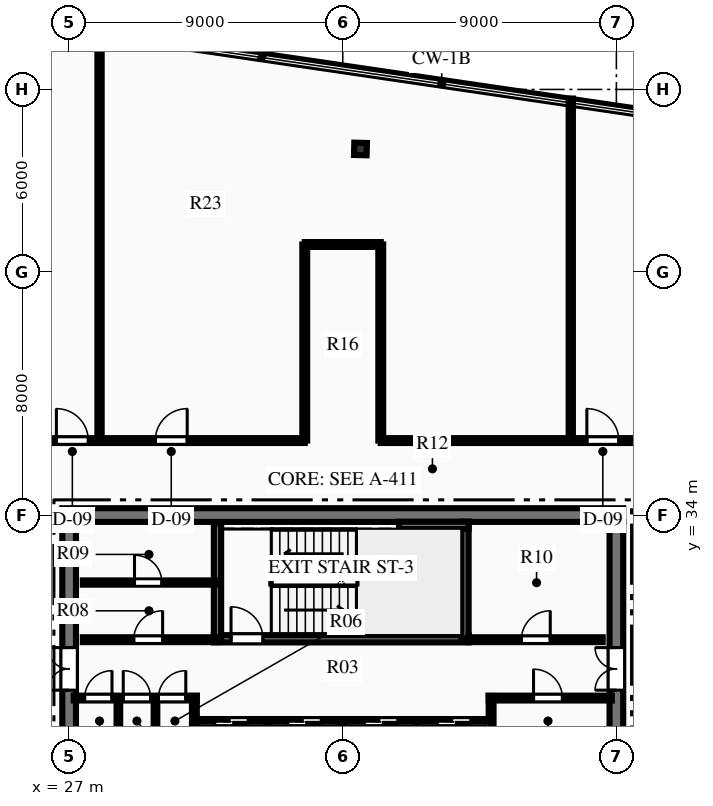
"""IFC4 building model, lengths in metres.
Left out: names, types, materials, properties, quantities, classifications, styles, units other than length and angle.
Written with IfcOpenShell. Run it as: python <this file> out.ifc"""

import sys

from ifc_helpers import new_model, si_unit, direction, frame, frame_2d, origin, origin_2d, place, context, subcontext, project, spatial, rectangle, i_section, extrude, element, fill, save


model = new_model("IFC4")
c1 = context("Model", 3, precision=1e-05, world=origin(), true_north=direction((0.0, 1.0)))
c2 = subcontext(c1, "Body", "Model", "MODEL_VIEW")
j1 = project(units=[si_unit("LENGTHUNIT", "METRE"), si_unit("PLANEANGLEUNIT", "RADIAN")], contexts=[c1])
p1 = place(None, origin())
s1 = spatial("IfcSite", under=j1, at=p1, CompositionType="ELEMENT")
p2 = place(p1, origin())
s2 = spatial("IfcBuilding", under=s1, at=p2, CompositionType="ELEMENT")
p3 = place(p2, frame((0.0, 0.0, 302.7)))
s3 = spatial("IfcBuildingStorey", under=s2, at=p3, CompositionType="ELEMENT", Elevation=302.7)
p4 = place(p3, frame((26.775, 34.0, 0.0), z_axis=(0.0, 0.0, 1.0), x_axis=(1.0, 0.0, 0.0)))
e1 = element("IfcWall", 1, at=p4, inside=s3, PredefinedType="SHEAR", context=c2, shape_type="SweptSolid", body=[
    extrude(rectangle(XDim=18.45, YDim=0.45, at=frame_2d((9.225, 0.0))), origin(), (0.0, 0.0, 1.0), 3.75),
])
p5 = place(p3, frame((27.0, 18.225, 0.0), z_axis=(0.0, 0.0, 1.0), x_axis=(0.0, 1.0, 0.0)))
e2 = element("IfcWall", 2, at=p5, inside=s3, PredefinedType="SHEAR", context=c2, shape_type="SweptSolid", body=[
    extrude(rectangle(XDim=15.55, YDim=0.45, at=frame_2d((7.775, 0.0))), origin(), (0.0, 0.0, 1.0), 3.75),
])
p6 = place(p5, frame((10.015, 0.0, 0.0)))
e3 = element("IfcOpeningElement", 3, at=p6, cuts=e2, PredefinedType="OPENING", context=c2, shape_type="SweptSolid", body=[
    extrude(rectangle(XDim=1.4, YDim=2.2, at=frame_2d((0.7, 1.1))), frame((0.0, 0.235, 0.0), z_axis=(0.0, -1.0, 0.0), x_axis=(1.0, 0.0, 0.0)), (0.0, 0.0, 1.0), 0.47),
])
p7 = place(p3, frame((45.0, 18.225, 0.0), z_axis=(0.0, 0.0, 1.0), x_axis=(0.0, 1.0, 0.0)))
e4 = element("IfcWall", 4, at=p7, inside=s3, PredefinedType="SHEAR", context=c2, shape_type="SweptSolid", body=[
    extrude(rectangle(XDim=15.55, YDim=0.45, at=frame_2d((7.775, 0.0))), origin(), (0.0, 0.0, 1.0), 3.75),
])
p8 = place(p7, frame((10.015, 0.0, 0.0)))
e5 = element("IfcOpeningElement", 5, at=p8, cuts=e4, PredefinedType="OPENING", context=c2, shape_type="SweptSolid", body=[
    extrude(rectangle(XDim=1.4, YDim=2.2, at=frame_2d((0.7, 1.1))), frame((0.0, 0.235, 0.0), z_axis=(0.0, -1.0, 0.0), x_axis=(1.0, 0.0, 0.0)), (0.0, 0.0, 1.0), 0.47),
])
p9 = place(p3, frame((31.76, 29.93, 0.0), z_axis=(0.0, 0.0, 1.0), x_axis=(1.0, 0.0, 0.0)))
e6 = element("IfcWall", 6, at=p9, inside=s3, PredefinedType="SHEAR", context=c2, shape_type="SweptSolid", body=[
    extrude(rectangle(XDim=8.38, YDim=0.24, at=frame_2d((4.19, 0.0))), origin(), (0.0, 0.0, 1.0), 3.75),
])
p10 = place(p9, frame((0.565, 0.0, 0.0)))
e7 = element("IfcOpeningElement", 7, at=p10, cuts=e6, PredefinedType="OPENING", context=c2, shape_type="SweptSolid", body=[
    extrude(rectangle(XDim=1.05, YDim=2.15, at=frame_2d((0.525, 1.075))), frame((0.0, 0.13, 0.0), z_axis=(0.0, -1.0, 0.0), x_axis=(1.0, 0.0, 0.0)), (0.0, 0.0, 1.0), 0.26),
])
p11 = place(p3, frame((31.88, 29.93, 0.0), z_axis=(0.0, 0.0, 1.0), x_axis=(0.0, 1.0, 0.0)))
e8 = element("IfcWall", 8, at=p11, inside=s3, PredefinedType="SHEAR", context=c2, shape_type="SweptSolid", body=[
    extrude(rectangle(XDim=3.79, YDim=0.24, at=frame_2d((1.895, 0.0))), origin(), (0.0, 0.0, 1.0), 3.75),
])
p12 = place(p3, frame((40.02, 29.93, 0.0), z_axis=(0.0, 0.0, 1.0), x_axis=(0.0, 1.0, 0.0)))
e9 = element("IfcWall", 9, at=p12, inside=s3, PredefinedType="SHEAR", context=c2, shape_type="SweptSolid", body=[
    extrude(rectangle(XDim=3.85, YDim=0.24, at=frame_2d((1.925, 0.0))), origin(), (0.0, 0.0, 1.0), 3.75),
])
p13 = place(p3, frame((37.85, 33.66, 0.0), z_axis=(0.0, 0.0, 1.0), x_axis=(1.0, 0.0, 0.0)))
e10 = element("IfcWall", 10, at=p13, inside=s3, PredefinedType="SHEAR", context=c2, shape_type="SweptSolid", body=[
    extrude(rectangle(XDim=2.29, YDim=0.24, at=frame_2d((1.145, 0.0))), origin(), (0.0, 0.0, 1.0), 3.75),
])
p14 = place(p3, frame((36.582, 46.042, 0.0), z_axis=(0.0, 0.0, 1.0), x_axis=(0.025304572866, 0.999679788028, 0.0)))
e11 = element("IfcColumn", 11, at=p14, inside=s3, PredefinedType="COLUMN", context=c2, shape_type="SweptSolid", body=[
    extrude(i_section(OverallWidth=0.406, OverallDepth=0.416, WebThickness=0.03, FlangeThickness=0.048, at=origin_2d()), origin(), (0.0, 0.0, 1.0), 3.75),
])
p15 = place(p3, frame((27.15, 27.98, 0.0), z_axis=(0.0, 0.0, 1.0), x_axis=(1.0, 0.0, 0.0)))
e12 = element("IfcWall", 12, at=p15, inside=s3, PredefinedType="PARTITIONING", context=c2, shape_type="SweptSolid", body=[
    extrude(rectangle(XDim=4.05, YDim=0.16, at=frame_2d((2.025, 0.0))), origin(), (0.0, 0.0, 1.0), 3.49),
])
p16 = place(p15, frame((0.36, 0.0, 0.0)))
e13 = element("IfcOpeningElement", 13, at=p16, cuts=e12, PredefinedType="OPENING", context=c2, shape_type="SweptSolid", body=[
    extrude(rectangle(XDim=0.9, YDim=2.15, at=frame_2d((0.45, 1.075))), frame((0.0, 0.09, 0.0), z_axis=(0.0, -1.0, 0.0), x_axis=(1.0, 0.0, 0.0)), (0.0, 0.0, 1.0), 0.18),
])
p17 = place(p15, frame((1.63, 0.0, 0.0)))
e14 = element("IfcOpeningElement", 14, at=p17, cuts=e12, PredefinedType="OPENING", context=c2, shape_type="SweptSolid", body=[
    extrude(rectangle(XDim=0.9, YDim=2.15, at=frame_2d((0.45, 1.075))), frame((0.0, 0.09, 0.0), z_axis=(0.0, -1.0, 0.0), x_axis=(1.0, 0.0, 0.0)), (0.0, 0.0, 1.0), 0.18),
])
p18 = place(p15, frame((2.788, 0.0, 0.0)))
e15 = element("IfcOpeningElement", 15, at=p18, cuts=e12, PredefinedType="OPENING", context=c2, shape_type="SweptSolid", body=[
    extrude(rectangle(XDim=0.9, YDim=2.15, at=frame_2d((0.45, 1.075))), frame((0.0, 0.09, 0.0), z_axis=(0.0, -1.0, 0.0), x_axis=(1.0, 0.0, 0.0)), (0.0, 0.0, 1.0), 0.18),
])
p19 = place(p3, frame((31.12, 26.54, 0.0), z_axis=(0.0, 0.0, 1.0), x_axis=(0.0, 1.0, 0.0)))
e16 = element("IfcWall", 16, at=p19, inside=s3, PredefinedType="PARTITIONING", context=c2, shape_type="SweptSolid", body=[
    extrude(rectangle(XDim=1.51, YDim=0.16, at=frame_2d((0.755, 0.0))), origin(), (0.0, 0.0, 1.0), 3.49),
])
p20 = place(p3, frame((40.8, 27.98, 0.0), z_axis=(0.0, 0.0, 1.0), x_axis=(1.0, 0.0, 0.0)))
e17 = element("IfcWall", 17, at=p20, inside=s3, PredefinedType="PARTITIONING", context=c2, shape_type="SweptSolid", body=[
    extrude(rectangle(XDim=4.05, YDim=0.16, at=frame_2d((2.025, 0.0))), origin(), (0.0, 0.0, 1.0), 3.49),
])
p21 = place(p20, frame((1.475, 0.0, 0.0)))
e18 = element("IfcOpeningElement", 18, at=p21, cuts=e17, PredefinedType="OPENING", context=c2, shape_type="SweptSolid", body=[
    extrude(rectangle(XDim=0.95, YDim=2.15, at=frame_2d((0.475, 1.075))), frame((0.0, 0.09, 0.0), z_axis=(0.0, -1.0, 0.0), x_axis=(1.0, 0.0, 0.0)), (0.0, 0.0, 1.0), 0.18),
])
p22 = place(p3, frame((40.88, 26.54, 0.0), z_axis=(0.0, 0.0, 1.0), x_axis=(0.0, 1.0, 0.0)))
e19 = element("IfcWall", 19, at=p22, inside=s3, PredefinedType="PARTITIONING", context=c2, shape_type="SweptSolid", body=[
    extrude(rectangle(XDim=1.51, YDim=0.16, at=frame_2d((0.755, 0.0))), origin(), (0.0, 0.0, 1.0), 3.49),
])
for number, where, z_axis, x_axis in (
    (20, (28.62, 26.54, 0.0), (0.0, 0.0, 1.0), (0.0, 1.0, 0.0)),
    (21, (29.84, 26.54, 0.0), (0.0, 0.0, 1.0), (0.0, 1.0, 0.0)),
):
    element("IfcWall", number, at=place(p3, frame(where, z_axis=z_axis, x_axis=x_axis)), inside=s3, PredefinedType="PARTITIONING", context=c2, shape_type="SweptSolid", body=[
        extrude(rectangle(XDim=1.44, YDim=0.12, at=frame_2d((0.72, 0.0))), origin(), (0.0, 0.0, 1.0), 3.49),
    ])
p23 = place(p3, frame((27.45, 29.9, 0.0), z_axis=(0.0, 0.0, 1.0), x_axis=(1.0, 0.0, 0.0)))
e22 = element("IfcWall", 22, at=p23, inside=s3, PredefinedType="PARTITIONING", context=c2, shape_type="SweptSolid", body=[
    extrude(rectangle(XDim=4.43, YDim=0.16, at=frame_2d((2.215, 0.0))), origin(), (0.0, 0.0, 1.0), 3.49),
])
p24 = place(p23, frame((1.675, 0.0, 0.0)))
e23 = element("IfcOpeningElement", 23, at=p24, cuts=e22, PredefinedType="OPENING", context=c2, shape_type="SweptSolid", body=[
    extrude(rectangle(XDim=0.95, YDim=2.15, at=frame_2d((0.475, 1.075))), frame((0.0, 0.09, 0.0), z_axis=(0.0, -1.0, 0.0), x_axis=(1.0, 0.0, 0.0)), (0.0, 0.0, 1.0), 0.18),
])
p25 = place(p3, frame((27.45, 31.78, 0.0), z_axis=(0.0, 0.0, 1.0), x_axis=(1.0, 0.0, 0.0)))
e24 = element("IfcWall", 24, at=p25, inside=s3, PredefinedType="PARTITIONING", context=c2, shape_type="SweptSolid", body=[
    extrude(rectangle(XDim=4.35, YDim=0.14, at=frame_2d((2.175, 0.0))), origin(), (0.0, 0.0, 1.0), 3.49),
])
p26 = place(p25, frame((1.7, 0.0, 0.0)))
e25 = element("IfcOpeningElement", 25, at=p26, cuts=e24, PredefinedType="OPENING", context=c2, shape_type="SweptSolid", body=[
    extrude(rectangle(XDim=0.9, YDim=2.15, at=frame_2d((0.45, 1.075))), frame((0.0, 0.08, 0.0), z_axis=(0.0, -1.0, 0.0), x_axis=(1.0, 0.0, 0.0)), (0.0, 0.0, 1.0), 0.16),
])
p27 = place(p3, frame((40.12, 29.9, 0.0), z_axis=(0.0, 0.0, 1.0), x_axis=(1.0, 0.0, 0.0)))
e26 = element("IfcWall", 26, at=p27, inside=s3, PredefinedType="PARTITIONING", context=c2, shape_type="SweptSolid", body=[
    extrude(rectangle(XDim=4.43, YDim=0.16, at=frame_2d((2.215, 0.0))), origin(), (0.0, 0.0, 1.0), 3.49),
])
p28 = place(p27, frame((1.755, 0.0, 0.0)))
e27 = element("IfcOpeningElement", 27, at=p28, cuts=e26, PredefinedType="OPENING", context=c2, shape_type="SweptSolid", body=[
    extrude(rectangle(XDim=0.95, YDim=2.15, at=frame_2d((0.475, 1.075))), frame((0.0, 0.09, 0.0), z_axis=(0.0, -1.0, 0.0), x_axis=(1.0, 0.0, 0.0)), (0.0, 0.0, 1.0), 0.18),
])
p29 = place(p3, frame((31.2, 27.2, 0.0), z_axis=(0.0, 0.0, 1.0), x_axis=(1.0, 0.0, 0.0)))
e28 = element("IfcWall", 28, at=p29, inside=s3, PredefinedType="PARTITIONING", context=c2, shape_type="SweptSolid", body=[
    extrude(rectangle(XDim=9.6, YDim=0.18, at=frame_2d((4.8, 0.0))), origin(), (0.0, 0.0, 1.0), 3.49),
])
p30 = place(p29, frame((0.59, 0.0, 0.0)))
e29 = element("IfcOpeningElement", 29, at=p30, cuts=e28, PredefinedType="OPENING", context=c2, shape_type="SweptSolid", body=[
    extrude(rectangle(XDim=1.1, YDim=2.15, at=frame_2d((0.55, 1.075))), frame((0.0, 0.1, 0.0), z_axis=(0.0, -1.0, 0.0), x_axis=(1.0, 0.0, 0.0)), (0.0, 0.0, 1.0), 0.2),
])
p31 = place(p29, frame((2.99, 0.0, 0.0)))
e30 = element("IfcOpeningElement", 30, at=p31, cuts=e28, PredefinedType="OPENING", context=c2, shape_type="SweptSolid", body=[
    extrude(rectangle(XDim=1.1, YDim=2.15, at=frame_2d((0.55, 1.075))), frame((0.0, 0.1, 0.0), z_axis=(0.0, -1.0, 0.0), x_axis=(1.0, 0.0, 0.0)), (0.0, 0.0, 1.0), 0.2),
])
p32 = place(p29, frame((5.51, 0.0, 0.0)))
e31 = element("IfcOpeningElement", 31, at=p32, cuts=e28, PredefinedType="OPENING", context=c2, shape_type="SweptSolid", body=[
    extrude(rectangle(XDim=1.1, YDim=2.15, at=frame_2d((0.55, 1.075))), frame((0.0, 0.1, 0.0), z_axis=(0.0, -1.0, 0.0), x_axis=(1.0, 0.0, 0.0)), (0.0, 0.0, 1.0), 0.2),
])
p33 = place(p29, frame((7.91, 0.0, 0.0)))
e32 = element("IfcOpeningElement", 32, at=p33, cuts=e28, PredefinedType="OPENING", context=c2, shape_type="SweptSolid", body=[
    extrude(rectangle(XDim=1.1, YDim=2.15, at=frame_2d((0.55, 1.075))), frame((0.0, 0.1, 0.0), z_axis=(0.0, -1.0, 0.0), x_axis=(1.0, 0.0, 0.0)), (0.0, 0.0, 1.0), 0.2),
])
for number, where, z_axis, x_axis in (
    (33, (33.54, 25.3, 0.0), (0.0, 0.0, 1.0), (0.0, 1.0, 0.0)),
    (34, (36.0, 25.3, 0.0), (0.0, 0.0, 1.0), (0.0, 1.0, 0.0)),
    (35, (38.46, 25.3, 0.0), (0.0, 0.0, 1.0), (0.0, 1.0, 0.0)),
):
    element("IfcWall", number, at=place(p3, frame(where, z_axis=z_axis, x_axis=x_axis)), inside=s3, PredefinedType="PARTITIONING", context=c2, shape_type="SweptSolid", body=[
        extrude(rectangle(XDim=1.9, YDim=0.18, at=frame_2d((0.95, 0.0))), origin(), (0.0, 0.0, 1.0), 3.49),
    ])
p34 = place(p3, frame((24.5, 36.45, 0.0), z_axis=(0.0, 0.0, 1.0), x_axis=(1.0, 0.0, 0.0)))
e36 = element("IfcWall", 36, at=p34, inside=s3, PredefinedType="PARTITIONING", context=c2, shape_type="SweptSolid", body=[
    extrude(rectangle(XDim=10.25, YDim=0.16, at=frame_2d((5.125, 0.0))), origin(), (0.0, 0.0, 1.0), 3.49),
])
p35 = place(p34, frame((2.081, 0.0, 0.0)))
e37 = element("IfcOpeningElement", 37, at=p35, cuts=e36, PredefinedType="OPENING", context=c2, shape_type="SweptSolid", body=[
    extrude(rectangle(XDim=1.05, YDim=2.15, at=frame_2d((0.525, 1.075))), frame((0.0, 0.09, 0.0), z_axis=(0.0, -1.0, 0.0), x_axis=(1.0, 0.0, 0.0)), (0.0, 0.0, 1.0), 0.18),
])
p36 = place(p34, frame((5.334, 0.0, 0.0)))
e38 = element("IfcOpeningElement", 38, at=p36, cuts=e36, PredefinedType="OPENING", context=c2, shape_type="SweptSolid", body=[
    extrude(rectangle(XDim=1.05, YDim=2.15, at=frame_2d((0.525, 1.075))), frame((0.0, 0.09, 0.0), z_axis=(0.0, -1.0, 0.0), x_axis=(1.0, 0.0, 0.0)), (0.0, 0.0, 1.0), 0.18),
])
p37 = place(p3, frame((37.25, 36.45, 0.0), z_axis=(0.0, 0.0, 1.0), x_axis=(1.0, 0.0, 0.0)))
e39 = element("IfcWall", 39, at=p37, inside=s3, PredefinedType="PARTITIONING", context=c2, shape_type="SweptSolid", body=[
    extrude(rectangle(XDim=10.25, YDim=0.16, at=frame_2d((5.125, 0.0))), origin(), (0.0, 0.0, 1.0), 3.49),
])
p38 = place(p37, frame((6.779, 0.0, 0.0)))
e40 = element("IfcOpeningElement", 40, at=p38, cuts=e39, PredefinedType="OPENING", context=c2, shape_type="SweptSolid", body=[
    extrude(rectangle(XDim=1.05, YDim=2.15, at=frame_2d((0.525, 1.075))), frame((0.0, 0.09, 0.0), z_axis=(0.0, -1.0, 0.0), x_axis=(1.0, 0.0, 0.0)), (0.0, 0.0, 1.0), 0.18),
])
for number, where, z_axis, x_axis in (
    (41, (34.75, 36.45, 0.0), (0.0, 0.0, 1.0), (0.0, 1.0, 0.0)),
    (42, (37.25, 36.45, 0.0), (0.0, 0.0, 1.0), (0.0, 1.0, 0.0)),
):
    element("IfcWall", number, at=place(p3, frame(where, z_axis=z_axis, x_axis=x_axis)), inside=s3, PredefinedType="PARTITIONING", context=c2, shape_type="SweptSolid", body=[
        extrude(rectangle(XDim=6.45, YDim=0.16, at=frame_2d((3.225, 0.0))), origin(), (0.0, 0.0, 1.0), 3.49),
    ])
p39 = place(p3, frame((34.75, 42.9, 0.0), z_axis=(0.0, 0.0, 1.0), x_axis=(1.0, 0.0, 0.0)))
e43 = element("IfcWall", 43, at=p39, inside=s3, PredefinedType="PARTITIONING", context=c2, shape_type="SweptSolid", body=[
    extrude(rectangle(XDim=2.5, YDim=0.16, at=frame_2d((1.25, 0.0))), origin(), (0.0, 0.0, 1.0), 3.49),
])
p40 = place(p3, frame((28.0, 36.45, 0.0), z_axis=(0.0, 0.0, 1.0), x_axis=(0.0, 1.0, 0.0)))
e44 = element("IfcWall", 44, at=p40, inside=s3, PredefinedType="PARTITIONING", context=c2, shape_type="SweptSolid", body=[
    extrude(rectangle(XDim=13.526, YDim=0.14, at=frame_2d((6.763, 0.0))), origin(), (0.0, 0.0, 1.0), 3.49),
])
p41 = place(p3, frame((43.5, 36.45, 0.0), z_axis=(0.0, 0.0, 1.0), x_axis=(0.0, 1.0, 0.0)))
e45 = element("IfcWall", 45, at=p41, inside=s3, PredefinedType="PARTITIONING", context=c2, shape_type="SweptSolid", body=[
    extrude(rectangle(XDim=11.251, YDim=0.14, at=frame_2d((5.625, 0.0))), origin(), (0.0, 0.0, 1.0), 3.49),
])
p42 = place(p16, origin())
e46 = element("IfcDoor", 46, at=p42, inside=s3, OperationType="SINGLE_SWING_RIGHT", PredefinedType="DOOR", context=c2, shape_type="SweptSolid", body=[
    extrude(rectangle(XDim=0.9, YDim=2.15, at=frame_2d((0.45, 1.075))), frame((0.0, 0.025, 0.0), z_axis=(0.0, -1.0, 0.0), x_axis=(1.0, 0.0, 0.0)), (0.0, 0.0, 1.0), 0.05),
])
fill(e13, e46)
p43 = place(p17, origin())
e47 = element("IfcDoor", 47, at=p43, inside=s3, OperationType="SINGLE_SWING_LEFT", PredefinedType="DOOR", context=c2, shape_type="SweptSolid", body=[
    extrude(rectangle(XDim=0.9, YDim=2.15, at=frame_2d((0.45, 1.075))), frame((0.0, 0.025, 0.0), z_axis=(0.0, -1.0, 0.0), x_axis=(1.0, 0.0, 0.0)), (0.0, 0.0, 1.0), 0.05),
])
fill(e14, e47)
p44 = place(p18, origin())
e48 = element("IfcDoor", 48, at=p44, inside=s3, OperationType="SINGLE_SWING_RIGHT", PredefinedType="DOOR", context=c2, shape_type="SweptSolid", body=[
    extrude(rectangle(XDim=0.9, YDim=2.15, at=frame_2d((0.45, 1.075))), frame((0.0, 0.025, 0.0), z_axis=(0.0, -1.0, 0.0), x_axis=(1.0, 0.0, 0.0)), (0.0, 0.0, 1.0), 0.05),
])
fill(e15, e48)
p45 = place(p21, origin())
e49 = element("IfcDoor", 49, at=p45, inside=s3, OperationType="SINGLE_SWING_LEFT", PredefinedType="DOOR", context=c2, shape_type="SweptSolid", body=[
    extrude(rectangle(XDim=0.95, YDim=2.15, at=frame_2d((0.475, 1.075))), frame((0.0, 0.025, 0.0), z_axis=(0.0, -1.0, 0.0), x_axis=(1.0, 0.0, 0.0)), (0.0, 0.0, 1.0), 0.05),
])
fill(e18, e49)
p46 = place(p24, origin())
e50 = element("IfcDoor", 50, at=p46, inside=s3, OperationType="SINGLE_SWING_RIGHT", PredefinedType="DOOR", context=c2, shape_type="SweptSolid", body=[
    extrude(rectangle(XDim=0.95, YDim=2.15, at=frame_2d((0.475, 1.075))), frame((0.0, 0.025, 0.0), z_axis=(0.0, -1.0, 0.0), x_axis=(1.0, 0.0, 0.0)), (0.0, 0.0, 1.0), 0.05),
])
fill(e23, e50)
p47 = place(p26, origin())
e51 = element("IfcDoor", 51, at=p47, inside=s3, OperationType="SINGLE_SWING_LEFT", PredefinedType="DOOR", context=c2, shape_type="SweptSolid", body=[
    extrude(rectangle(XDim=0.9, YDim=2.15, at=frame_2d((0.45, 1.075))), frame((0.0, 0.025, 0.0), z_axis=(0.0, -1.0, 0.0), x_axis=(1.0, 0.0, 0.0)), (0.0, 0.0, 1.0), 0.05),
])
fill(e25, e51)
p48 = place(p28, origin())
e52 = element("IfcDoor", 52, at=p48, inside=s3, OperationType="SINGLE_SWING_RIGHT", PredefinedType="DOOR", context=c2, shape_type="SweptSolid", body=[
    extrude(rectangle(XDim=0.95, YDim=2.15, at=frame_2d((0.475, 1.075))), frame((0.0, 0.025, 0.0), z_axis=(0.0, -1.0, 0.0), x_axis=(1.0, 0.0, 0.0)), (0.0, 0.0, 1.0), 0.05),
])
fill(e27, e52)
p49 = place(p10, origin())
e53 = element("IfcDoor", 53, at=p49, inside=s3, OperationType="SINGLE_SWING_LEFT", PredefinedType="DOOR", context=c2, shape_type="SweptSolid", body=[
    extrude(rectangle(XDim=1.05, YDim=2.15, at=frame_2d((0.525, 1.075))), frame((0.0, 0.025, 0.0), z_axis=(0.0, -1.0, 0.0), x_axis=(1.0, 0.0, 0.0)), (0.0, 0.0, 1.0), 0.05),
])
fill(e7, e53)
p50 = place(p6, origin())
e54 = element("IfcDoor", 54, at=p50, inside=s3, OperationType="DOUBLE_DOOR_SINGLE_SWING", PredefinedType="DOOR", context=c2, shape_type="SweptSolid", body=[
    extrude(rectangle(XDim=1.4, YDim=2.2, at=frame_2d((0.7, 1.1))), frame((0.0, 0.025, 0.0), z_axis=(0.0, -1.0, 0.0), x_axis=(1.0, 0.0, 0.0)), (0.0, 0.0, 1.0), 0.05),
])
fill(e3, e54)
p51 = place(p8, origin())
e55 = element("IfcDoor", 55, at=p51, inside=s3, OperationType="DOUBLE_DOOR_SINGLE_SWING", PredefinedType="DOOR", context=c2, shape_type="SweptSolid", body=[
    extrude(rectangle(XDim=1.4, YDim=2.2, at=frame_2d((0.7, 1.1))), frame((0.0, 0.025, 0.0), z_axis=(0.0, -1.0, 0.0), x_axis=(1.0, 0.0, 0.0)), (0.0, 0.0, 1.0), 0.05),
])
fill(e5, e55)
p52 = place(p35, origin())
e56 = element("IfcDoor", 56, at=p52, inside=s3, OperationType="SINGLE_SWING_LEFT", PredefinedType="DOOR", context=c2, shape_type="SweptSolid", body=[
    extrude(rectangle(XDim=1.05, YDim=2.15, at=frame_2d((0.525, 1.075))), frame((0.0, 0.025, 0.0), z_axis=(0.0, -1.0, 0.0), x_axis=(1.0, 0.0, 0.0)), (0.0, 0.0, 1.0), 0.05),
])
fill(e37, e56)
p53 = place(p36, origin())
e57 = element("IfcDoor", 57, at=p53, inside=s3, OperationType="SINGLE_SWING_RIGHT", PredefinedType="DOOR", context=c2, shape_type="SweptSolid", body=[
    extrude(rectangle(XDim=1.05, YDim=2.15, at=frame_2d((0.525, 1.075))), frame((0.0, 0.025, 0.0), z_axis=(0.0, -1.0, 0.0), x_axis=(1.0, 0.0, 0.0)), (0.0, 0.0, 1.0), 0.05),
])
fill(e38, e57)
p54 = place(p38, origin())
e58 = element("IfcDoor", 58, at=p54, inside=s3, OperationType="SINGLE_SWING_LEFT", PredefinedType="DOOR", context=c2, shape_type="SweptSolid", body=[
    extrude(rectangle(XDim=1.05, YDim=2.15, at=frame_2d((0.525, 1.075))), frame((0.0, 0.025, 0.0), z_axis=(0.0, -1.0, 0.0), x_axis=(1.0, 0.0, 0.0)), (0.0, 0.0, 1.0), 0.05),
])
fill(e40, e58)
p55 = place(p30, origin())
e59 = element("IfcDoor", 59, at=p55, inside=s3, OperationType="SLIDING_TO_LEFT", PredefinedType="DOOR", context=c2, shape_type="SweptSolid", body=[
    extrude(rectangle(XDim=1.1, YDim=2.15, at=frame_2d((0.55, 1.075))), frame((0.0, 0.025, 0.0), z_axis=(0.0, -1.0, 0.0), x_axis=(1.0, 0.0, 0.0)), (0.0, 0.0, 1.0), 0.05),
])
fill(e29, e59)
p56 = place(p31, origin())
e60 = element("IfcDoor", 60, at=p56, inside=s3, OperationType="SLIDING_TO_LEFT", PredefinedType="DOOR", context=c2, shape_type="SweptSolid", body=[
    extrude(rectangle(XDim=1.1, YDim=2.15, at=frame_2d((0.55, 1.075))), frame((0.0, 0.025, 0.0), z_axis=(0.0, -1.0, 0.0), x_axis=(1.0, 0.0, 0.0)), (0.0, 0.0, 1.0), 0.05),
])
fill(e30, e60)
p57 = place(p32, origin())
e61 = element("IfcDoor", 61, at=p57, inside=s3, OperationType="SLIDING_TO_LEFT", PredefinedType="DOOR", context=c2, shape_type="SweptSolid", body=[
    extrude(rectangle(XDim=1.1, YDim=2.15, at=frame_2d((0.55, 1.075))), frame((0.0, 0.025, 0.0), z_axis=(0.0, -1.0, 0.0), x_axis=(1.0, 0.0, 0.0)), (0.0, 0.0, 1.0), 0.05),
])
fill(e31, e61)
p58 = place(p33, origin())
e62 = element("IfcDoor", 62, at=p58, inside=s3, OperationType="SLIDING_TO_LEFT", PredefinedType="DOOR", context=c2, shape_type="SweptSolid", body=[
    extrude(rectangle(XDim=1.1, YDim=2.15, at=frame_2d((0.55, 1.075))), frame((0.0, 0.025, 0.0), z_axis=(0.0, -1.0, 0.0), x_axis=(1.0, 0.0, 0.0)), (0.0, 0.0, 1.0), 0.05),
])
fill(e32, e62)
save(model, sys.argv[1])
